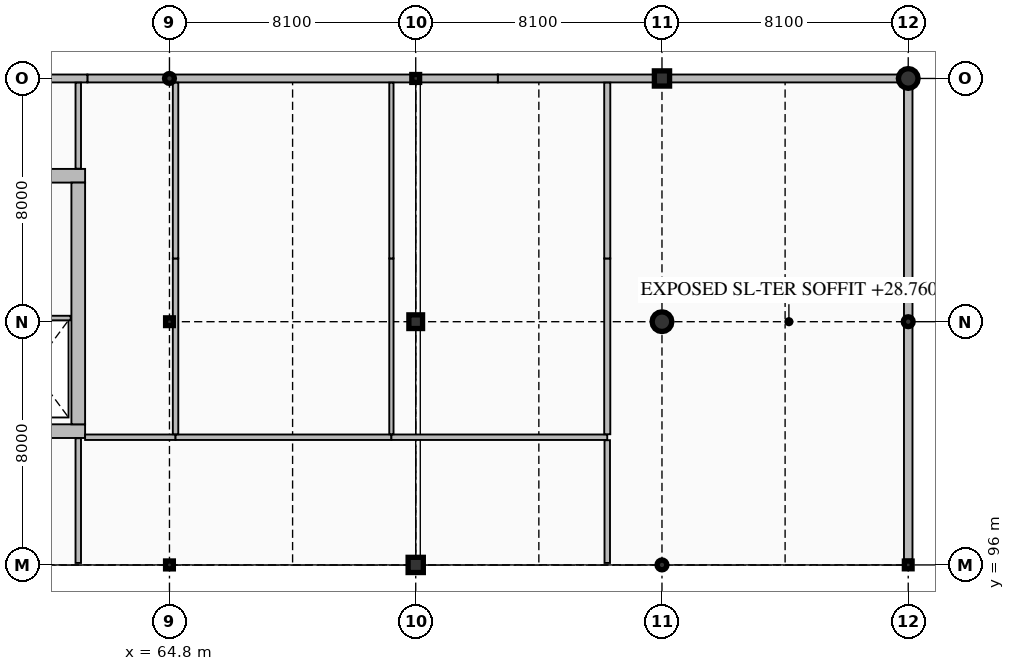
"""IFC4 building model, lengths in metres.
Left out: names, types, materials, properties, quantities, classifications, styles, units other than length and angle.
Written with IfcOpenShell. Run it as: python <this file> out.ifc"""

import sys

from ifc_helpers import new_model, si_unit, direction, frame, frame_2d, origin, origin_2d, place, context, subcontext, project, spatial, rectangle, hollow_rectangle, circle, hollow_circle, i_section, extrude, element, fill, save


model = new_model("IFC4")
c1 = context("Model", 3, precision=1e-05, world=origin(), true_north=direction((0.0, 1.0)))
c2 = subcontext(c1, "Body", "Model", "MODEL_VIEW")
j1 = project(units=[si_unit("LENGTHUNIT", "METRE"), si_unit("PLANEANGLEUNIT", "RADIAN")], contexts=[c1])
p1 = place(None, origin())
s1 = spatial("IfcSite", under=j1, at=p1, CompositionType="ELEMENT")
p2 = place(p1, origin())
s2 = spatial("IfcBuilding", under=s1, at=p2, CompositionType="ELEMENT")
p3 = place(p2, frame((0.0, 0.0, 24.9)))
s3 = spatial("IfcBuildingStorey", under=s2, at=p3, CompositionType="ELEMENT", Elevation=24.9)
p4 = place(p3, frame((46.775, 100.4, 0.0), z_axis=(0.0, 0.0, 1.0), x_axis=(1.0, 0.0, 0.0)))
e1 = element("IfcWall", 1, at=p4, inside=s3, PredefinedType="SHEAR", context=c2, shape_type="SweptSolid", body=[
    extrude(rectangle(XDim=15.25, YDim=0.45, at=frame_2d((7.625, 0.0))), origin(), (0.0, 0.0, 1.0), 4.2),
])
p5 = place(p4, frame((0.975, 0.0, 0.0)))
e2 = element("IfcOpeningElement", 2, at=p5, cuts=e1, PredefinedType="OPENING", context=c2, shape_type="SweptSolid", body=[
    extrude(rectangle(XDim=1.15, YDim=2.25, at=frame_2d((0.575, 1.125))), frame((0.0, 0.235, 0.0), z_axis=(0.0, -1.0, 0.0), x_axis=(1.0, 0.0, 0.0)), (0.0, 0.0, 1.0), 0.47),
])
p6 = place(p4, frame((10.258, 0.0, 0.0)))
e3 = element("IfcOpeningElement", 3, at=p6, cuts=e1, PredefinedType="OPENING", context=c2, shape_type="SweptSolid", body=[
    extrude(rectangle(XDim=1.1, YDim=2.2, at=frame_2d((0.55, 1.1))), frame((0.0, 0.235, 0.0), z_axis=(0.0, -1.0, 0.0), x_axis=(1.0, 0.0, 0.0)), (0.0, 0.0, 1.0), 0.47),
])
p7 = place(p4, frame((12.972, 0.0, 0.0)))
e4 = element("IfcOpeningElement", 4, at=p7, cuts=e1, PredefinedType="OPENING", context=c2, shape_type="SweptSolid", body=[
    extrude(rectangle(XDim=1.1, YDim=2.2, at=frame_2d((0.55, 1.1))), frame((0.0, 0.235, 0.0), z_axis=(0.0, -1.0, 0.0), x_axis=(1.0, 0.0, 0.0)), (0.0, 0.0, 1.0), 0.47),
])
p8 = place(p3, frame((46.775, 108.8, 0.0), z_axis=(0.0, 0.0, 1.0), x_axis=(1.0, 0.0, 0.0)))
e5 = element("IfcWall", 5, at=p8, inside=s3, PredefinedType="SHEAR", context=c2, shape_type="SweptSolid", body=[
    extrude(rectangle(XDim=15.25, YDim=0.45, at=frame_2d((7.625, 0.0))), origin(), (0.0, 0.0, 1.0), 4.2),
])
p9 = place(p3, frame((61.8, 100.625, 0.0), z_axis=(0.0, 0.0, 1.0), x_axis=(0.0, 1.0, 0.0)))
e6 = element("IfcWall", 6, at=p9, inside=s3, PredefinedType="SHEAR", context=c2, shape_type="SweptSolid", body=[
    extrude(rectangle(XDim=7.95, YDim=0.45, at=frame_2d((3.975, 0.0))), origin(), (0.0, 0.0, 1.0), 4.2),
])
p10 = place(p3, frame((64.8, 96.0, 0.0), z_axis=(0.0, 0.0, 1.0), x_axis=(1.0, 0.0, 0.0)))
e7 = element("IfcColumn", 7, at=p10, inside=s3, PredefinedType="COLUMN", context=c2, shape_type="SweptSolid", body=[
    extrude(i_section(OverallWidth=0.256, OverallDepth=0.26, WebThickness=0.011, FlangeThickness=0.017, FilletRadius=0.013, at=origin_2d()), origin(), (0.0, 0.0, 1.0), 4.2),
])
p11 = place(p3, frame((64.8, 104.0, 0.0), z_axis=(0.0, 0.0, 1.0), x_axis=(1.0, 0.0, 0.0)))
e8 = element("IfcColumn", 8, at=p11, inside=s3, PredefinedType="COLUMN", context=c2, shape_type="SweptSolid", body=[
    extrude(hollow_rectangle(XDim=0.254, YDim=0.254, WallThickness=0.013, InnerFilletRadius=0.013, OuterFilletRadius=0.025, at=origin_2d()), origin(), (0.0, 0.0, 1.0), 4.2),
])
p12 = place(p3, frame((64.8, 112.0, 0.0), z_axis=(0.0, 0.0, 1.0), x_axis=(1.0, 0.0, 0.0)))
e9 = element("IfcColumn", 9, at=p12, inside=s3, PredefinedType="COLUMN", context=c2, shape_type="SweptSolid", body=[
    extrude(hollow_circle(Radius=0.162, WallThickness=0.013, at=origin_2d()), origin(), (0.0, 0.0, 1.0), 4.2),
])
p13 = place(p3, frame((72.9, 96.0, 0.0), z_axis=(0.0, 0.0, 1.0), x_axis=(1.0, 0.0, 0.0)))
e10 = element("IfcColumn", 10, at=p13, inside=s3, PredefinedType="COLUMN", context=c2, shape_type="SweptSolid", body=[
    extrude(rectangle(XDim=0.5, YDim=0.5, at=origin_2d()), origin(), (0.0, 0.0, 1.0), 4.2),
])
p14 = place(p3, frame((72.9, 104.0, 0.0), z_axis=(0.0, 0.0, 1.0), x_axis=(1.0, 0.0, 0.0)))
e11 = element("IfcColumn", 11, at=p14, inside=s3, PredefinedType="COLUMN", context=c2, shape_type="SweptSolid", body=[
    extrude(rectangle(XDim=0.45, YDim=0.45, at=origin_2d()), origin(), (0.0, 0.0, 1.0), 4.2),
])
p15 = place(p3, frame((72.9, 112.0, 0.0), z_axis=(0.0, 0.0, 1.0), x_axis=(1.0, 0.0, 0.0)))
e12 = element("IfcColumn", 12, at=p15, inside=s3, PredefinedType="COLUMN", context=c2, shape_type="SweptSolid", body=[
    extrude(i_section(OverallWidth=0.256, OverallDepth=0.26, WebThickness=0.011, FlangeThickness=0.017, FilletRadius=0.013, at=origin_2d()), origin(), (0.0, 0.0, 1.0), 4.2),
])
p16 = place(p3, frame((81.0, 96.0, 0.0), z_axis=(0.0, 0.0, 1.0), x_axis=(1.0, 0.0, 0.0)))
e13 = element("IfcColumn", 13, at=p16, inside=s3, PredefinedType="COLUMN", context=c2, shape_type="SweptSolid", body=[
    extrude(hollow_circle(Radius=0.162, WallThickness=0.013, at=origin_2d()), origin(), (0.0, 0.0, 1.0), 3.86),
])
p17 = place(p3, frame((81.0, 104.0, 0.0), z_axis=(0.0, 0.0, 1.0), x_axis=(1.0, 0.0, 0.0)))
e14 = element("IfcColumn", 14, at=p17, inside=s3, PredefinedType="COLUMN", context=c2, shape_type="SweptSolid", body=[
    extrude(circle(Radius=0.325, at=origin_2d()), origin(), (0.0, 0.0, 1.0), 3.86),
])
p18 = place(p3, frame((81.0, 112.0, 0.0), z_axis=(0.0, 0.0, 1.0), x_axis=(1.0, 0.0, 0.0)))
e15 = element("IfcColumn", 15, at=p18, inside=s3, PredefinedType="COLUMN", context=c2, shape_type="SweptSolid", body=[
    extrude(rectangle(XDim=0.5, YDim=0.5, at=origin_2d()), origin(), (0.0, 0.0, 1.0), 3.86),
])
p19 = place(p3, frame((89.1, 96.0, 0.0), z_axis=(0.0, 0.0, 1.0), x_axis=(1.0, 0.0, 0.0)))
e16 = element("IfcColumn", 16, at=p19, inside=s3, PredefinedType="COLUMN", context=c2, shape_type="SweptSolid", body=[
    extrude(hollow_rectangle(XDim=0.254, YDim=0.254, WallThickness=0.013, InnerFilletRadius=0.013, OuterFilletRadius=0.025, at=origin_2d()), origin(), (0.0, 0.0, 1.0), 3.86),
])
p20 = place(p3, frame((89.1, 104.0, 0.0), z_axis=(0.0, 0.0, 1.0), x_axis=(1.0, 0.0, 0.0)))
e17 = element("IfcColumn", 17, at=p20, inside=s3, PredefinedType="COLUMN", context=c2, shape_type="SweptSolid", body=[
    extrude(hollow_circle(Radius=0.162, WallThickness=0.013, at=origin_2d()), origin(), (0.0, 0.0, 1.0), 3.86),
])
p21 = place(p3, frame((89.1, 112.0, 0.0), z_axis=(0.0, 0.0, 1.0), x_axis=(1.0, 0.0, 0.0)))
e18 = element("IfcColumn", 18, at=p21, inside=s3, PredefinedType="COLUMN", context=c2, shape_type="SweptSolid", body=[
    extrude(circle(Radius=0.325, at=origin_2d()), origin(), (0.0, 0.0, 1.0), 3.86),
])
p22 = place(p3, frame((89.1, 96.18, 0.0), z_axis=(0.0, 0.0, 1.0), x_axis=(0.0, 1.0, 0.0)))
e19 = element("IfcWall", 19, at=p22, inside=s3, PredefinedType="SOLIDWALL", context=c2, shape_type="SweptSolid", body=[
    extrude(rectangle(XDim=15.82, YDim=0.28, at=frame_2d((7.91, 0.0))), origin(), (0.0, 0.0, 1.0), 3.352),
])
p23 = place(p22, frame((11.07, 0.0, 0.0)))
e20 = element("IfcOpeningElement", 20, at=p23, cuts=e19, PredefinedType="OPENING", context=c2, shape_type="SweptSolid", body=[
    extrude(rectangle(XDim=1.5, YDim=2.3, at=frame_2d((0.75, 1.15))), frame((0.0, 0.15, 0.0), z_axis=(0.0, -1.0, 0.0), x_axis=(1.0, 0.0, 0.0)), (0.0, 0.0, 1.0), 0.3),
])
p24 = place(p3, frame((89.1, 112.0, 0.0), z_axis=(0.0, 0.0, 1.0), x_axis=(-1.0, 0.0, 0.0)))
e21 = element("IfcWall", 21, at=p24, inside=s3, PredefinedType="SOLIDWALL", context=c2, shape_type="SweptSolid", body=[
    extrude(rectangle(XDim=13.5, YDim=0.26, at=frame_2d((6.75, 0.0))), origin(), (0.0, 0.0, 1.0), 3.302),
])
p25 = place(p24, frame((3.15, 0.0, 0.95)))
e22 = element("IfcOpeningElement", 22, at=p25, cuts=e21, PredefinedType="OPENING", context=c2, shape_type="SweptSolid", body=[
    extrude(rectangle(XDim=3.0, YDim=1.8, at=frame_2d((1.5, 0.9))), frame((0.0, 0.14, 0.0), z_axis=(0.0, -1.0, 0.0), x_axis=(1.0, 0.0, 0.0)), (0.0, 0.0, 1.0), 0.28),
])
p26 = place(p3, frame((75.6, 112.0, 0.0), z_axis=(0.0, 0.0, 1.0), x_axis=(-1.0, 0.0, 0.0)))
e23 = element("IfcWall", 23, at=p26, inside=s3, PredefinedType="SOLIDWALL", context=c2, shape_type="SweptSolid", body=[
    extrude(rectangle(XDim=13.5, YDim=0.26, at=frame_2d((6.75, 0.0))), origin(), (0.0, 0.0, 1.0), 3.302),
])
p27 = place(p26, frame((5.4, 0.0, 0.95)))
e24 = element("IfcOpeningElement", 24, at=p27, cuts=e23, PredefinedType="OPENING", context=c2, shape_type="SweptSolid", body=[
    extrude(rectangle(XDim=3.15, YDim=1.6, at=frame_2d((1.575, 0.8))), frame((0.0, 0.14, 0.0), z_axis=(0.0, -1.0, 0.0), x_axis=(1.0, 0.0, 0.0)), (0.0, 0.0, 1.0), 0.28),
])
p28 = place(p3, frame((62.1, 112.0, 0.0), z_axis=(0.0, 0.0, 1.0), x_axis=(-1.0, 0.0, 0.0)))
e25 = element("IfcWall", 25, at=p28, inside=s3, PredefinedType="SOLIDWALL", context=c2, shape_type="SweptSolid", body=[
    extrude(rectangle(XDim=13.5, YDim=0.26, at=frame_2d((6.75, 0.0))), origin(), (0.0, 0.0, 1.0), 3.402),
])
p29 = place(p28, frame((7.2, 0.0, 0.95)))
e26 = element("IfcOpeningElement", 26, at=p29, cuts=e25, PredefinedType="OPENING", context=c2, shape_type="SweptSolid", body=[
    extrude(rectangle(XDim=3.6, YDim=1.8, at=frame_2d((1.8, 0.9))), frame((0.0, 0.14, 0.0), z_axis=(0.0, -1.0, 0.0), x_axis=(1.0, 0.0, 0.0)), (0.0, 0.0, 1.0), 0.28),
])
p30 = place(p3, frame((56.3, 104.12, 0.0), z_axis=(0.0, 0.0, 1.0), x_axis=(1.0, 0.0, 0.0)))
e27 = element("IfcWall", 27, at=p30, inside=s3, PredefinedType="PARTITIONING", context=c2, shape_type="SweptSolid", body=[
    extrude(rectangle(XDim=5.25, YDim=0.15, at=frame_2d((2.625, 0.0))), origin(), (0.0, 0.0, 1.0), 3.96),
])
p31 = place(p3, frame((62.025, 100.2, 0.0), z_axis=(0.0, 0.0, 1.0), x_axis=(1.0, 0.0, 0.0)))
e28 = element("IfcWall", 28, at=p31, inside=s3, PredefinedType="PARTITIONING", context=c2, shape_type="SweptSolid", body=[
    extrude(rectangle(XDim=2.975, YDim=0.18, at=frame_2d((1.488, 0.0))), origin(), (0.0, 0.0, 1.0), 3.96),
])
p32 = place(p31, frame((0.887, 0.0, 0.0)))
e29 = element("IfcOpeningElement", 29, at=p32, cuts=e28, PredefinedType="OPENING", context=c2, shape_type="SweptSolid", body=[
    extrude(rectangle(XDim=1.2, YDim=2.2, at=frame_2d((0.6, 1.1))), frame((0.0, 0.1, 0.0), z_axis=(0.0, -1.0, 0.0), x_axis=(1.0, 0.0, 0.0)), (0.0, 0.0, 1.0), 0.2),
])
p33 = place(p3, frame((65.0, 100.2, 0.0), z_axis=(0.0, 0.0, 1.0), x_axis=(1.0, 0.0, 0.0)))
e30 = element("IfcWall", 30, at=p33, inside=s3, PredefinedType="PARTITIONING", context=c2, shape_type="SweptSolid", body=[
    extrude(rectangle(XDim=7.1, YDim=0.18, at=frame_2d((3.55, 0.0))), origin(), (0.0, 0.0, 1.0), 3.96),
])
p34 = place(p33, frame((3.0, 0.0, 0.0)))
e31 = element("IfcOpeningElement", 31, at=p34, cuts=e30, PredefinedType="OPENING", context=c2, shape_type="SweptSolid", body=[
    extrude(rectangle(XDim=1.1, YDim=2.3, at=frame_2d((0.55, 1.15))), frame((0.0, 0.1, 0.0), z_axis=(0.0, -1.0, 0.0), x_axis=(1.0, 0.0, 0.0)), (0.0, 0.0, 1.0), 0.2),
])
p35 = place(p3, frame((72.1, 100.2, 0.0), z_axis=(0.0, 0.0, 1.0), x_axis=(1.0, 0.0, 0.0)))
e32 = element("IfcWall", 32, at=p35, inside=s3, PredefinedType="PARTITIONING", context=c2, shape_type="SweptSolid", body=[
    extrude(rectangle(XDim=7.1, YDim=0.18, at=frame_2d((3.55, 0.0))), origin(), (0.0, 0.0, 1.0), 3.96),
])
p36 = place(p35, frame((3.0, 0.0, 0.0)))
e33 = element("IfcOpeningElement", 33, at=p36, cuts=e32, PredefinedType="OPENING", context=c2, shape_type="SweptSolid", body=[
    extrude(rectangle(XDim=1.1, YDim=2.3, at=frame_2d((0.55, 1.15))), frame((0.0, 0.1, 0.0), z_axis=(0.0, -1.0, 0.0), x_axis=(1.0, 0.0, 0.0)), (0.0, 0.0, 1.0), 0.2),
])
p37 = place(p3, frame((61.8, 96.065, 0.0), z_axis=(0.0, 0.0, 1.0), x_axis=(0.0, 1.0, 0.0)))
e34 = element("IfcWall", 34, at=p37, inside=s3, PredefinedType="PARTITIONING", context=c2, shape_type="SweptSolid", body=[
    extrude(rectangle(XDim=4.102, YDim=0.18, at=frame_2d((2.051, 0.0))), origin(), (0.0, 0.0, 1.0), 3.96),
])
p38 = place(p37, frame((1.501, 0.0, 0.0)))
e35 = element("IfcOpeningElement", 35, at=p38, cuts=e34, PredefinedType="OPENING", context=c2, shape_type="SweptSolid", body=[
    extrude(rectangle(XDim=1.1, YDim=2.2, at=frame_2d((0.55, 1.1))), frame((0.0, 0.1, 0.0), z_axis=(0.0, -1.0, 0.0), x_axis=(1.0, 0.0, 0.0)), (0.0, 0.0, 1.0), 0.2),
])
p39 = place(p3, frame((61.8, 109.033, 0.0), z_axis=(0.0, 0.0, 1.0), x_axis=(0.0, 1.0, 0.0)))
e36 = element("IfcWall", 36, at=p39, inside=s3, PredefinedType="PARTITIONING", context=c2, shape_type="SweptSolid", body=[
    extrude(rectangle(XDim=2.829, YDim=0.18, at=frame_2d((1.415, 0.0))), origin(), (0.0, 0.0, 1.0), 3.96),
])
p40 = place(p39, frame((0.865, 0.0, 0.0)))
e37 = element("IfcOpeningElement", 37, at=p40, cuts=e36, PredefinedType="OPENING", context=c2, shape_type="SweptSolid", body=[
    extrude(rectangle(XDim=1.1, YDim=2.2, at=frame_2d((0.55, 1.1))), frame((0.0, 0.1, 0.0), z_axis=(0.0, -1.0, 0.0), x_axis=(1.0, 0.0, 0.0)), (0.0, 0.0, 1.0), 0.2),
])
for number, where, z_axis, x_axis in (
    (38, (65.0, 100.298, 0.0), (0.0, 0.0, 1.0), (0.0, 1.0, 0.0)),
    (39, (65.0, 106.08, 0.0), (0.0, 0.0, 1.0), (0.0, 1.0, 0.0)),
):
    element("IfcWall", number, at=place(p3, frame(where, z_axis=z_axis, x_axis=x_axis)), inside=s3, PredefinedType="PARTITIONING", context=c2, shape_type="SweptSolid", body=[
        extrude(rectangle(XDim=5.782, YDim=0.18, at=frame_2d((2.891, 0.0))), origin(), (0.0, 0.0, 1.0), 3.452),
    ])
for number, where, z_axis, x_axis in (
    (40, (72.1, 100.298, 0.0), (0.0, 0.0, 1.0), (0.0, 1.0, 0.0)),
    (41, (72.1, 106.08, 0.0), (0.0, 0.0, 1.0), (0.0, 1.0, 0.0)),
):
    element("IfcWall", number, at=place(p3, frame(where, z_axis=z_axis, x_axis=x_axis)), inside=s3, PredefinedType="PARTITIONING", context=c2, shape_type="SweptSolid", body=[
        extrude(rectangle(XDim=5.782, YDim=0.14, at=frame_2d((2.891, 0.0))), origin(), (0.0, 0.0, 1.0), 3.96),
    ])
p41 = place(p3, frame((79.2, 96.065, 0.0), z_axis=(0.0, 0.0, 1.0), x_axis=(0.0, 1.0, 0.0)))
e42 = element("IfcWall", 42, at=p41, inside=s3, PredefinedType="PARTITIONING", context=c2, shape_type="SweptSolid", body=[
    extrude(rectangle(XDim=4.037, YDim=0.18, at=frame_2d((2.019, 0.0))), origin(), (0.0, 0.0, 1.0), 3.96),
])
p42 = place(p41, frame((1.469, 0.0, 0.0)))
e43 = element("IfcOpeningElement", 43, at=p42, cuts=e42, PredefinedType="OPENING", context=c2, shape_type="SweptSolid", body=[
    extrude(rectangle(XDim=1.1, YDim=2.2, at=frame_2d((0.55, 1.1))), frame((0.0, 0.1, 0.0), z_axis=(0.0, -1.0, 0.0), x_axis=(1.0, 0.0, 0.0)), (0.0, 0.0, 1.0), 0.2),
])
for number, where, z_axis, x_axis in (
    (44, (79.2, 100.298, 0.0), (0.0, 0.0, 1.0), (0.0, 1.0, 0.0)),
    (45, (79.2, 106.08, 0.0), (0.0, 0.0, 1.0), (0.0, 1.0, 0.0)),
):
    element("IfcWall", number, at=place(p3, frame(where, z_axis=z_axis, x_axis=x_axis)), inside=s3, PredefinedType="PARTITIONING", context=c2, shape_type="SweptSolid", body=[
        extrude(rectangle(XDim=5.782, YDim=0.2, at=frame_2d((2.891, 0.0))), origin(), (0.0, 0.0, 1.0), 3.96),
    ])
p43 = place(p23, frame((1.5, 0.0, 0.0), z_axis=(0.0, 0.0, 1.0), x_axis=(-1.0, 0.0, 0.0)))
e46 = element("IfcDoor", 46, at=p43, inside=s3, OperationType="DOUBLE_DOOR_SINGLE_SWING", PredefinedType="DOOR", context=c2, shape_type="SweptSolid", body=[
    extrude(rectangle(XDim=1.5, YDim=2.3, at=frame_2d((0.75, 1.15))), frame((0.0, 0.025, 0.0), z_axis=(0.0, -1.0, 0.0), x_axis=(1.0, 0.0, 0.0)), (0.0, 0.0, 1.0), 0.05),
])
fill(e20, e46)
p44 = place(p25, origin())
e47 = element("IfcWindow", 47, at=p44, inside=s3, PartitioningType="TRIPLE_PANEL_VERTICAL", PredefinedType="WINDOW", context=c2, shape_type="SweptSolid", body=[
    extrude(rectangle(XDim=3.0, YDim=1.8, at=frame_2d((1.5, 0.9))), frame((0.0, 0.03, 0.0), z_axis=(0.0, -1.0, 0.0), x_axis=(1.0, 0.0, 0.0)), (0.0, 0.0, 1.0), 0.06),
])
fill(e22, e47)
p45 = place(p27, origin())
e48 = element("IfcWindow", 48, at=p45, inside=s3, PartitioningType="TRIPLE_PANEL_VERTICAL", PredefinedType="WINDOW", context=c2, shape_type="SweptSolid", body=[
    extrude(rectangle(XDim=3.15, YDim=1.6, at=frame_2d((1.575, 0.8))), frame((0.0, 0.03, 0.0), z_axis=(0.0, -1.0, 0.0), x_axis=(1.0, 0.0, 0.0)), (0.0, 0.0, 1.0), 0.06),
])
fill(e24, e48)
p46 = place(p32, frame((1.2, 0.0, 0.0), z_axis=(0.0, 0.0, 1.0), x_axis=(-1.0, 0.0, 0.0)))
e49 = element("IfcDoor", 49, at=p46, inside=s3, OperationType="SINGLE_SWING_RIGHT", PredefinedType="DOOR", context=c2, shape_type="SweptSolid", body=[
    extrude(rectangle(XDim=1.2, YDim=2.2, at=frame_2d((0.6, 1.1))), frame((0.0, 0.025, 0.0), z_axis=(0.0, -1.0, 0.0), x_axis=(1.0, 0.0, 0.0)), (0.0, 0.0, 1.0), 0.05),
])
fill(e29, e49)
p47 = place(p34, origin())
e50 = element("IfcDoor", 50, at=p47, inside=s3, OperationType="SINGLE_SWING_LEFT", PredefinedType="DOOR", context=c2, shape_type="SweptSolid", body=[
    extrude(rectangle(XDim=1.1, YDim=2.3, at=frame_2d((0.55, 1.15))), frame((0.0, 0.025, 0.0), z_axis=(0.0, -1.0, 0.0), x_axis=(1.0, 0.0, 0.0)), (0.0, 0.0, 1.0), 0.05),
])
fill(e31, e50)
p48 = place(p36, origin())
e51 = element("IfcDoor", 51, at=p48, inside=s3, OperationType="SINGLE_SWING_RIGHT", PredefinedType="DOOR", context=c2, shape_type="SweptSolid", body=[
    extrude(rectangle(XDim=1.1, YDim=2.3, at=frame_2d((0.55, 1.15))), frame((0.0, 0.025, 0.0), z_axis=(0.0, -1.0, 0.0), x_axis=(1.0, 0.0, 0.0)), (0.0, 0.0, 1.0), 0.05),
])
fill(e33, e51)
p49 = place(p38, frame((1.1, 0.0, 0.0), z_axis=(0.0, 0.0, 1.0), x_axis=(-1.0, 0.0, 0.0)))
e52 = element("IfcDoor", 52, at=p49, inside=s3, OperationType="SINGLE_SWING_LEFT", PredefinedType="DOOR", context=c2, shape_type="SweptSolid", body=[
    extrude(rectangle(XDim=1.1, YDim=2.2, at=frame_2d((0.55, 1.1))), frame((0.0, 0.025, 0.0), z_axis=(0.0, -1.0, 0.0), x_axis=(1.0, 0.0, 0.0)), (0.0, 0.0, 1.0), 0.05),
])
fill(e35, e52)
p50 = place(p40, origin())
e53 = element("IfcDoor", 53, at=p50, inside=s3, OperationType="SINGLE_SWING_RIGHT", PredefinedType="DOOR", context=c2, shape_type="SweptSolid", body=[
    extrude(rectangle(XDim=1.1, YDim=2.2, at=frame_2d((0.55, 1.1))), frame((0.0, 0.025, 0.0), z_axis=(0.0, -1.0, 0.0), x_axis=(1.0, 0.0, 0.0)), (0.0, 0.0, 1.0), 0.05),
])
fill(e37, e53)
p51 = place(p42, frame((1.1, 0.0, 0.0), z_axis=(0.0, 0.0, 1.0), x_axis=(-1.0, 0.0, 0.0)))
e54 = element("IfcDoor", 54, at=p51, inside=s3, OperationType="SINGLE_SWING_LEFT", PredefinedType="DOOR", context=c2, shape_type="SweptSolid", body=[
    extrude(rectangle(XDim=1.1, YDim=2.2, at=frame_2d((0.55, 1.1))), frame((0.0, 0.025, 0.0), z_axis=(0.0, -1.0, 0.0), x_axis=(1.0, 0.0, 0.0)), (0.0, 0.0, 1.0), 0.05),
])
fill(e43, e54)
save(model, sys.argv[1])
